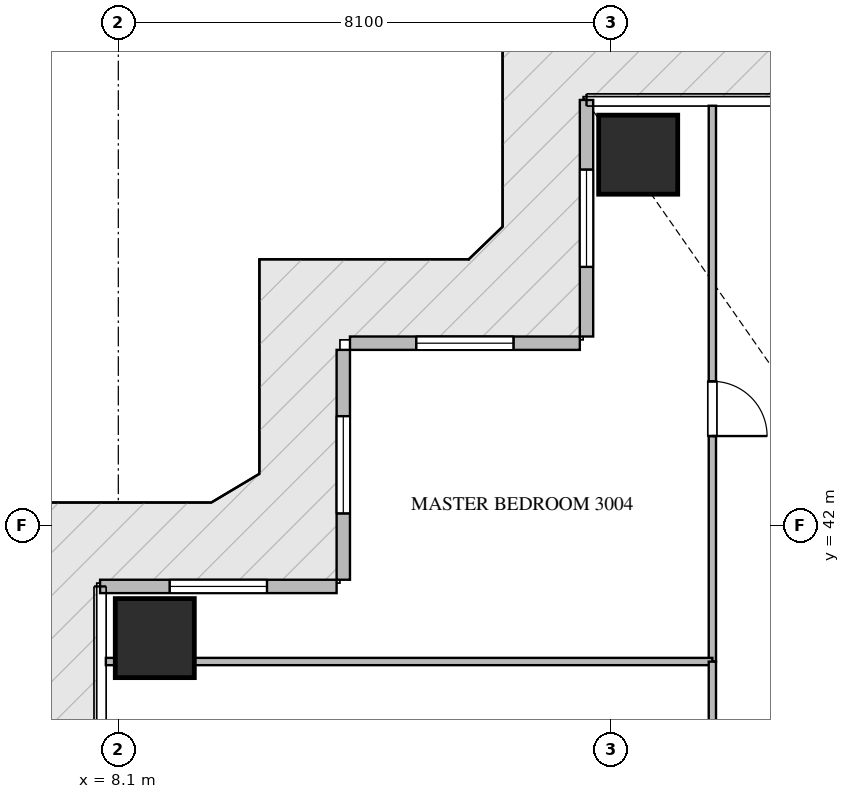
"""IFC4 building model, lengths in metres.
Left out: names, types, materials, properties, quantities, classifications, styles, units other than length and angle.
Written with IfcOpenShell. Run it as: python <this file> out.ifc"""

import sys

from ifc_helpers import new_model, si_unit, direction, frame, frame_2d, origin, origin_2d, place, context, subcontext, project, spatial, rectangle, extrude, source, transform, mapped, element, fill, save


model = new_model("IFC4")
c1 = context("Model", 3, precision=1e-05, world=origin(), true_north=direction((0.0, 1.0)))
c2 = subcontext(c1, "Body", "Model", "MODEL_VIEW")
j1 = project(units=[si_unit("LENGTHUNIT", "METRE"), si_unit("PLANEANGLEUNIT", "RADIAN")], contexts=[c1])
p1 = place(None, origin())
s1 = spatial("IfcSite", under=j1, at=p1, CompositionType="ELEMENT")
p2 = place(p1, origin())
s2 = spatial("IfcBuilding", under=s1, at=p2, CompositionType="ELEMENT")
p3 = place(p2, frame((0.0, 0.0, 123.9)))
s3 = spatial("IfcBuildingStorey", under=s2, at=p3, CompositionType="ELEMENT", Elevation=123.9)
m1 = source(origin(), c2, "Body", "SweptSolid", [
    extrude(rectangle(XDim=1.3, YDim=1.3, at=origin_2d()), origin(), (0.0, 0.0, 1.0), 3.75),
])
for number, where, z_axis, x_axis in (
    (1, (16.65, 48.1, -0.26), (0.0, 0.0, 1.0), (1.0, 0.0, 0.0)),
    (2, (8.7, 40.15, -0.26), (0.0, 0.0, 1.0), (1.0, 0.0, 0.0)),
):
    element("IfcColumn", number, at=place(p3, frame(where, z_axis=z_axis, x_axis=x_axis)), inside=s3, PredefinedType="COLUMN", context=c2, shape_type="MappedRepresentation", body=[
        mapped(m1, transform((0.0, 0.0, 0.0), scale=1.0)),
    ])
p4 = place(p3, frame((15.8, 49.0, 0.0), z_axis=(0.0, 0.0, 1.0), x_axis=(0.0, -1.0, 0.0)))
e3 = element("IfcWall", 3, at=p4, inside=s3, PredefinedType="ELEMENTEDWALL", context=c2, shape_type="SweptSolid", body=[
    extrude(rectangle(XDim=3.89, YDim=0.22, at=frame_2d((1.945, 0.0))), origin(), (0.0, 0.0, 1.0), 3.475),
])
p5 = place(p4, frame((1.145, 0.0, 0.65)))
e4 = element("IfcOpeningElement", 4, at=p5, cuts=e3, PredefinedType="OPENING", context=c2, shape_type="SweptSolid", body=[
    extrude(rectangle(XDim=1.6, YDim=2.1, at=frame_2d((0.8, 1.05))), frame((0.0, 0.12, 0.0), z_axis=(0.0, -1.0, 0.0), x_axis=(1.0, 0.0, 0.0)), (0.0, 0.0, 1.0), 0.24),
])
p6 = place(p3, frame((15.69, 45.0, 0.0), z_axis=(0.0, 0.0, 1.0), x_axis=(-1.0, 0.0, 0.0)))
e5 = element("IfcWall", 5, at=p6, inside=s3, PredefinedType="ELEMENTEDWALL", context=c2, shape_type="SweptSolid", body=[
    extrude(rectangle(XDim=3.78, YDim=0.22, at=frame_2d((1.89, 0.0))), origin(), (0.0, 0.0, 1.0), 3.475),
])
p7 = place(p6, frame((1.09, 0.0, 0.65)))
e6 = element("IfcOpeningElement", 6, at=p7, cuts=e5, PredefinedType="OPENING", context=c2, shape_type="SweptSolid", body=[
    extrude(rectangle(XDim=1.6, YDim=2.1, at=frame_2d((0.8, 1.05))), frame((0.0, 0.12, 0.0), z_axis=(0.0, -1.0, 0.0), x_axis=(1.0, 0.0, 0.0)), (0.0, 0.0, 1.0), 0.24),
])
p8 = place(p3, frame((11.8, 44.89, 0.0), z_axis=(0.0, 0.0, 1.0), x_axis=(0.0, -1.0, 0.0)))
e7 = element("IfcWall", 7, at=p8, inside=s3, PredefinedType="ELEMENTEDWALL", context=c2, shape_type="SweptSolid", body=[
    extrude(rectangle(XDim=3.78, YDim=0.22, at=frame_2d((1.89, 0.0))), origin(), (0.0, 0.0, 1.0), 3.475),
])
p9 = place(p8, frame((1.09, 0.0, 0.65)))
e8 = element("IfcOpeningElement", 8, at=p9, cuts=e7, PredefinedType="OPENING", context=c2, shape_type="SweptSolid", body=[
    extrude(rectangle(XDim=1.6, YDim=2.1, at=frame_2d((0.8, 1.05))), frame((0.0, 0.12, 0.0), z_axis=(0.0, -1.0, 0.0), x_axis=(1.0, 0.0, 0.0)), (0.0, 0.0, 1.0), 0.24),
])
p10 = place(p3, frame((11.69, 41.0, 0.0), z_axis=(0.0, 0.0, 1.0), x_axis=(-1.0, 0.0, 0.0)))
e9 = element("IfcWall", 9, at=p10, inside=s3, PredefinedType="ELEMENTEDWALL", context=c2, shape_type="SweptSolid", body=[
    extrude(rectangle(XDim=3.89, YDim=0.22, at=frame_2d((1.945, 0.0))), origin(), (0.0, 0.0, 1.0), 3.475),
])
p11 = place(p10, frame((1.145, 0.0, 0.65)))
e10 = element("IfcOpeningElement", 10, at=p11, cuts=e9, PredefinedType="OPENING", context=c2, shape_type="SweptSolid", body=[
    extrude(rectangle(XDim=1.6, YDim=2.1, at=frame_2d((0.8, 1.05))), frame((0.0, 0.12, 0.0), z_axis=(0.0, -1.0, 0.0), x_axis=(1.0, 0.0, 0.0)), (0.0, 0.0, 1.0), 0.24),
])
p12 = place(p3, frame((17.87, 48.905, 0.0), z_axis=(0.0, 0.0, 1.0), x_axis=(0.0, -1.0, 0.0)))
e11 = element("IfcWall", 11, at=p12, inside=s3, PredefinedType="PARTITIONING", context=c2, shape_type="SweptSolid", body=[
    extrude(rectangle(XDim=9.14, YDim=0.12, at=frame_2d((4.57, 0.0))), origin(), (0.0, 0.0, 1.0), 3.49),
])
p13 = place(p12, frame((4.532, 0.0, 0.0)))
e12 = element("IfcOpeningElement", 12, at=p13, cuts=e11, PredefinedType="OPENING", context=c2, shape_type="SweptSolid", body=[
    extrude(rectangle(XDim=0.9, YDim=2.1, at=frame_2d((0.45, 1.05))), frame((0.0, 0.07, 0.0), z_axis=(0.0, -1.0, 0.0), x_axis=(1.0, 0.0, 0.0)), (0.0, 0.0, 1.0), 0.14),
])
p14 = place(p3, frame((7.895, 39.765, 0.0), z_axis=(0.0, 0.0, 1.0), x_axis=(1.0, 0.0, 0.0)))
e13 = element("IfcWall", 13, at=p14, inside=s3, PredefinedType="PARTITIONING", context=c2, shape_type="SweptSolid", body=[
    extrude(rectangle(XDim=9.975, YDim=0.12, at=frame_2d((4.988, 0.0))), origin(), (0.0, 0.0, 1.0), 3.49),
])
p15 = place(p3, frame((17.87, 39.763, 0.0), z_axis=(0.0, 0.0, 1.0), x_axis=(0.0, -1.0, 0.0)))
e14 = element("IfcWall", 14, at=p15, inside=s3, PredefinedType="PARTITIONING", context=c2, shape_type="SweptSolid", body=[
    extrude(rectangle(XDim=4.113, YDim=0.12, at=frame_2d((2.057, 0.0))), origin(), (0.0, 0.0, 1.0), 3.49),
])
p16 = place(p15, frame((1.631, 0.0, 0.0)))
e15 = element("IfcOpeningElement", 15, at=p16, cuts=e14, PredefinedType="OPENING", context=c2, shape_type="SweptSolid", body=[
    extrude(rectangle(XDim=0.85, YDim=2.1, at=frame_2d((0.425, 1.05))), frame((0.0, 0.07, 0.0), z_axis=(0.0, -1.0, 0.0), x_axis=(1.0, 0.0, 0.0)), (0.0, 0.0, 1.0), 0.14),
])
m2 = source(origin(), c2, "Body", "SweptSolid", [
    extrude(rectangle(XDim=1.6, YDim=2.1, at=frame_2d((0.8, 1.05))), frame((0.0, 0.03, 0.0), z_axis=(0.0, -1.0, 0.0), x_axis=(1.0, 0.0, 0.0)), (0.0, 0.0, 1.0), 0.06),
])
p17 = place(p5, origin())
e16 = element("IfcWindow", 16, at=p17, inside=s3, PartitioningType="SINGLE_PANEL", PredefinedType="WINDOW", context=c2, shape_type="MappedRepresentation", body=[
    mapped(m2, transform((0.0, 0.0, 0.0), scale=1.0)),
])
fill(e4, e16)
p18 = place(p7, origin())
e17 = element("IfcWindow", 17, at=p18, inside=s3, PartitioningType="SINGLE_PANEL", PredefinedType="WINDOW", context=c2, shape_type="MappedRepresentation", body=[
    mapped(m2, transform((0.0, 0.0, 0.0), scale=1.0)),
])
fill(e6, e17)
p19 = place(p9, origin())
e18 = element("IfcWindow", 18, at=p19, inside=s3, PartitioningType="SINGLE_PANEL", PredefinedType="WINDOW", context=c2, shape_type="MappedRepresentation", body=[
    mapped(m2, transform((0.0, 0.0, 0.0), scale=1.0)),
])
fill(e8, e18)
p20 = place(p11, origin())
e19 = element("IfcWindow", 19, at=p20, inside=s3, PartitioningType="SINGLE_PANEL", PredefinedType="WINDOW", context=c2, shape_type="MappedRepresentation", body=[
    mapped(m2, transform((0.0, 0.0, 0.0), scale=1.0)),
])
fill(e10, e19)
m3 = source(origin(), c2, "Body", "SweptSolid", [
    extrude(rectangle(XDim=0.9, YDim=2.1, at=frame_2d((0.45, 1.05))), frame((0.0, 0.025, 0.0), z_axis=(0.0, -1.0, 0.0), x_axis=(1.0, 0.0, 0.0)), (0.0, 0.0, 1.0), 0.05),
])
p21 = place(p13, origin())
e20 = element("IfcDoor", 20, at=p21, inside=s3, OperationType="SINGLE_SWING_RIGHT", PredefinedType="DOOR", context=c2, shape_type="MappedRepresentation", body=[
    mapped(m3, transform((0.0, 0.0, 0.0), scale=1.0)),
])
fill(e12, e20)
save(model, sys.argv[1])
